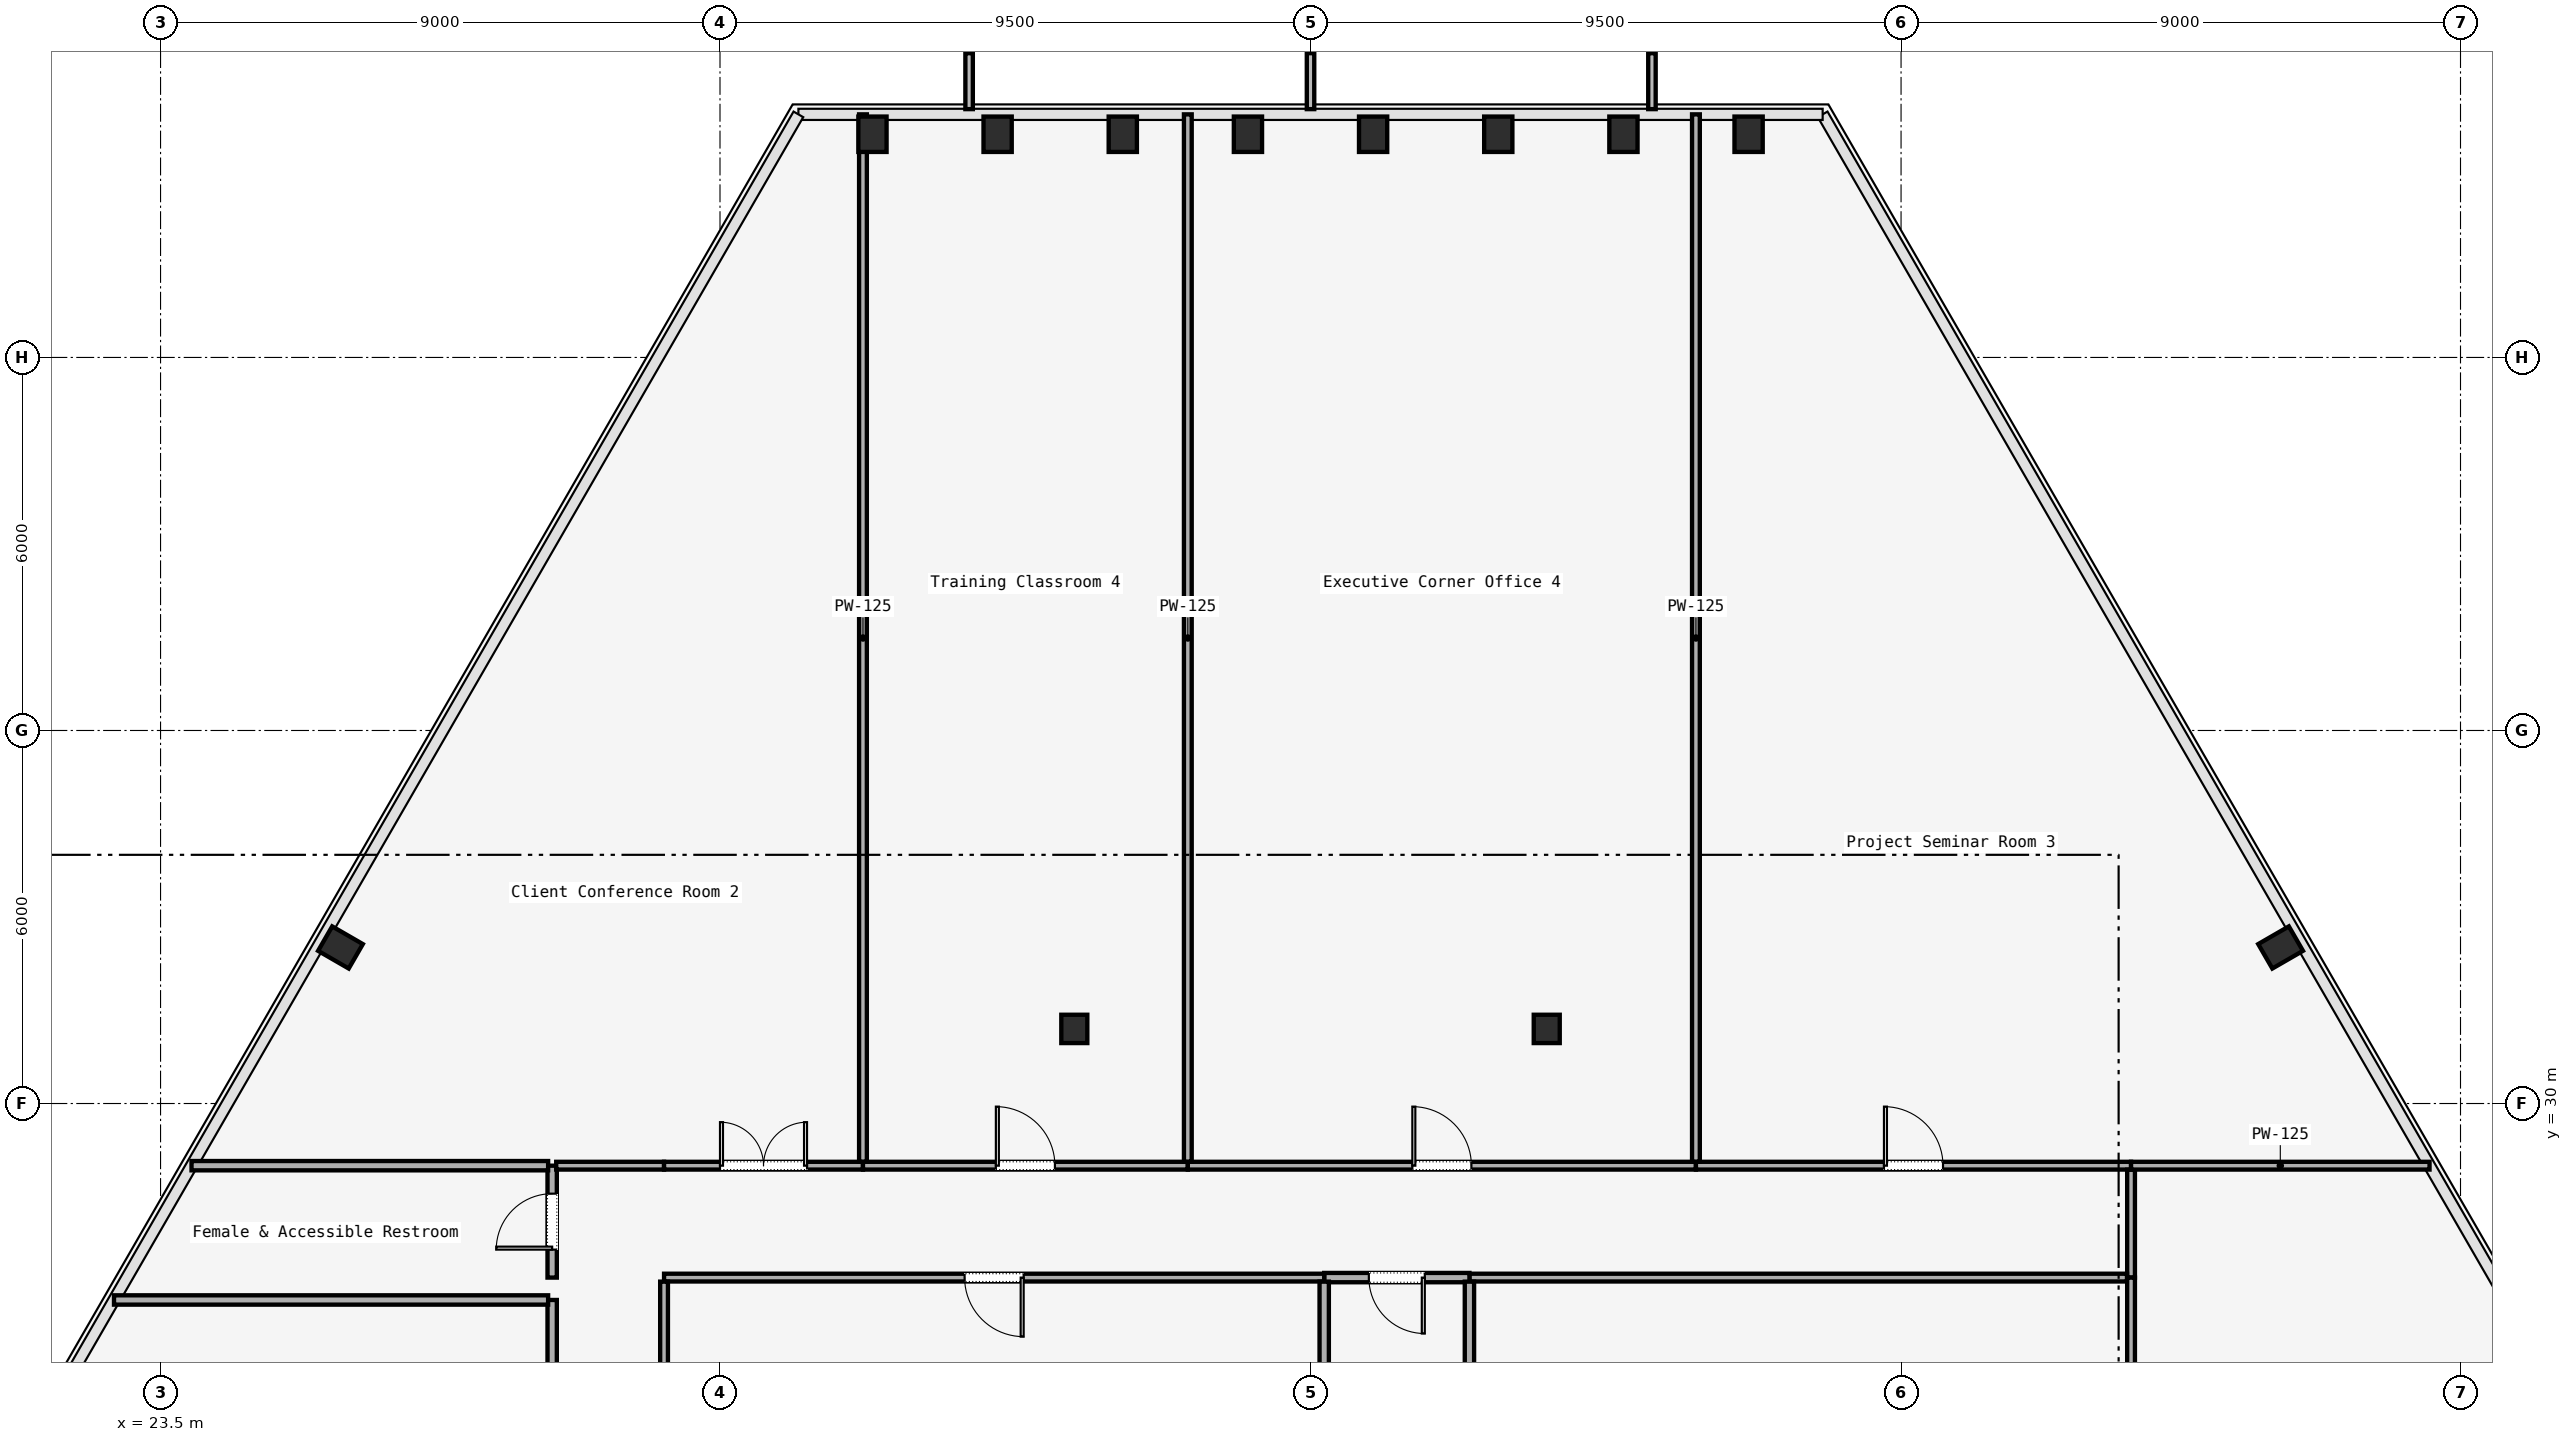
"""IFC4 building model, lengths in metres.
Left out: names, types, materials, properties, quantities, classifications, styles, units other than length and angle.
Written with IfcOpenShell. Run it as: python <this file> out.ifc"""

import sys

from ifc_helpers import new_model, si_unit, direction, frame, frame_2d, origin, origin_2d, place, context, subcontext, project, spatial, rectangle, i_section, extrude, element, fill, save


model = new_model("IFC4")
c1 = context("Model", 3, precision=1e-05, world=origin(), true_north=direction((0.0, 1.0)))
c2 = subcontext(c1, "Body", "Model", "MODEL_VIEW")
j1 = project(units=[si_unit("LENGTHUNIT", "METRE"), si_unit("PLANEANGLEUNIT", "RADIAN")], contexts=[c1])
p1 = place(None, origin())
s1 = spatial("IfcSite", under=j1, at=p1, CompositionType="ELEMENT")
p2 = place(p1, origin())
s2 = spatial("IfcBuilding", under=s1, at=p2, CompositionType="ELEMENT")
p3 = place(p2, frame((0.0, 0.0, 36.0)))
s3 = spatial("IfcBuildingStorey", under=s2, at=p3, CompositionType="ELEMENT", Elevation=36.0)
for number, where, z_axis, x_axis in (
    (1, (38.2, 31.2, 0.0), (0.0, 0.0, 1.0), (1.0, 0.0, 0.0)),
    (2, (45.8, 31.2, 0.0), (0.0, 0.0, 1.0), (1.0, 0.0, 0.0)),
):
    element("IfcColumn", number, at=place(p3, frame(where, z_axis=z_axis, x_axis=x_axis)), inside=s3, PredefinedType="COLUMN", context=c2, shape_type="SweptSolid", body=[
        extrude(i_section(OverallWidth=0.418, OverallDepth=0.456, WebThickness=0.042, FlangeThickness=0.067, FilletRadius=0.015, at=origin_2d()), origin(), (0.0, 0.0, 1.0), 3.58),
    ])
for number, where, z_axis, x_axis in (
    (3, (57.606, 32.51, 0.0), (0.0, 0.0, 1.0), (-0.5, 0.866, 0.0)),
    (4, (49.047, 45.59, 0.0), (0.0, 0.0, 1.0), (1.0, 0.0, 0.0)),
    (5, (47.034, 45.59, 0.0), (0.0, 0.0, 1.0), (1.0, 0.0, 0.0)),
    (6, (45.02, 45.59, 0.0), (0.0, 0.0, 1.0), (1.0, 0.0, 0.0)),
    (7, (43.007, 45.59, 0.0), (0.0, 0.0, 1.0), (1.0, 0.0, 0.0)),
    (8, (40.993, 45.59, 0.0), (0.0, 0.0, 1.0), (1.0, 0.0, 0.0)),
    (9, (38.98, 45.59, 0.0), (0.0, 0.0, 1.0), (1.0, 0.0, 0.0)),
    (10, (36.966, 45.59, 0.0), (0.0, 0.0, 1.0), (1.0, 0.0, 0.0)),
    (11, (34.953, 45.59, 0.0), (0.0, 0.0, 1.0), (1.0, 0.0, 0.0)),
    (12, (26.394, 32.51, 0.0), (0.0, 0.0, 1.0), (0.5, 0.866, 0.0)),
):
    element("IfcColumn", number, at=place(p3, frame(where, z_axis=z_axis, x_axis=x_axis)), inside=s3, PredefinedType="COLUMN", context=c2, shape_type="SweptSolid", body=[
        extrude(i_section(OverallWidth=0.454, OverallDepth=0.569, WebThickness=0.078, FlangeThickness=0.08, FilletRadius=0.015, at=origin_2d()), origin(), (0.0, 0.0, 1.0), 3.58),
    ])
p4 = place(p3, frame((29.8, 17.065, 0.0), z_axis=(0.0, 0.0, 1.0), x_axis=(0.0, 1.0, 0.0)))
e13 = element("IfcWall", 13, at=p4, inside=s3, PredefinedType="PARTITIONING", context=c2, shape_type="SweptSolid", body=[
    extrude(rectangle(XDim=9.775, YDim=0.15, at=frame_2d((4.888, 0.0))), origin(), (0.0, 0.0, 1.0), 2.933),
])
p5 = place(p4, frame((4.413, 0.0, 0.0)))
e14 = element("IfcOpeningElement", 14, at=p5, cuts=e13, PredefinedType="OPENING", context=c2, shape_type="SweptSolid", body=[
    extrude(rectangle(XDim=0.95, YDim=2.2, at=frame_2d((0.475, 1.1))), frame((0.0, 0.075, 0.0), z_axis=(0.0, -1.0, 0.0), x_axis=(1.0, 0.0, 0.0)), (0.0, 0.0, 1.0), 0.15),
])
p6 = place(p3, frame((29.8, 27.2, 0.0), z_axis=(0.0, 0.0, 1.0), x_axis=(0.0, 1.0, 0.0)))
e15 = element("IfcWall", 15, at=p6, inside=s3, PredefinedType="PARTITIONING", context=c2, shape_type="SweptSolid", body=[
    extrude(rectangle(XDim=1.8, YDim=0.15, at=frame_2d((0.9, 0.0))), origin(), (0.0, 0.0, 1.0), 2.933),
])
p7 = place(p6, frame((0.45, 0.0, 0.0)))
e16 = element("IfcOpeningElement", 16, at=p7, cuts=e15, PredefinedType="OPENING", context=c2, shape_type="SweptSolid", body=[
    extrude(rectangle(XDim=0.9, YDim=2.15, at=frame_2d((0.45, 1.075))), frame((0.0, 0.075, 0.0), z_axis=(0.0, -1.0, 0.0), x_axis=(1.0, 0.0, 0.0)), (0.0, 0.0, 1.0), 0.15),
])
p8 = place(p3, frame((29.865, 29.0, 0.0), z_axis=(0.0, 0.0, 1.0), x_axis=(1.0, 0.0, 0.0)))
e17 = element("IfcWall", 17, at=p8, inside=s3, PredefinedType="PARTITIONING", context=c2, shape_type="SweptSolid", body=[
    extrude(rectangle(XDim=1.735, YDim=0.125, at=frame_2d((0.868, 0.0))), origin(), (0.0, 0.0, 1.0), 2.933),
])
p9 = place(p3, frame((31.6, 29.0, 0.0), z_axis=(0.0, 0.0, 1.0), x_axis=(1.0, 0.0, 0.0)))
e18 = element("IfcWall", 18, at=p9, inside=s3, PredefinedType="PARTITIONING", context=c2, shape_type="SweptSolid", body=[
    extrude(rectangle(XDim=3.2, YDim=0.125, at=frame_2d((1.6, 0.0))), origin(), (0.0, 0.0, 1.0), 2.933),
])
p10 = place(p9, frame((0.9, 0.0, 0.0)))
e19 = element("IfcOpeningElement", 19, at=p10, cuts=e18, PredefinedType="OPENING", context=c2, shape_type="SweptSolid", body=[
    extrude(rectangle(XDim=1.4, YDim=2.2, at=frame_2d((0.7, 1.1))), frame((0.0, 0.062, 0.0), z_axis=(0.0, -1.0, 0.0), x_axis=(1.0, 0.0, 0.0)), (0.0, 0.0, 1.0), 0.125),
])
p11 = place(p3, frame((34.8, 29.0, 0.0), z_axis=(0.0, 0.0, 1.0), x_axis=(1.0, 0.0, 0.0)))
e20 = element("IfcWall", 20, at=p11, inside=s3, PredefinedType="PARTITIONING", context=c2, shape_type="SweptSolid", body=[
    extrude(rectangle(XDim=5.226, YDim=0.125, at=frame_2d((2.613, 0.0))), origin(), (0.0, 0.0, 1.0), 2.933),
])
p12 = place(p11, frame((2.138, 0.0, 0.0)))
e21 = element("IfcOpeningElement", 21, at=p12, cuts=e20, PredefinedType="OPENING", context=c2, shape_type="SweptSolid", body=[
    extrude(rectangle(XDim=0.95, YDim=2.2, at=frame_2d((0.475, 1.1))), frame((0.0, 0.062, 0.0), z_axis=(0.0, -1.0, 0.0), x_axis=(1.0, 0.0, 0.0)), (0.0, 0.0, 1.0), 0.125),
])
p13 = place(p3, frame((40.026, 29.0, 0.0), z_axis=(0.0, 0.0, 1.0), x_axis=(1.0, 0.0, 0.0)))
e22 = element("IfcWall", 22, at=p13, inside=s3, PredefinedType="PARTITIONING", context=c2, shape_type="SweptSolid", body=[
    extrude(rectangle(XDim=8.174, YDim=0.125, at=frame_2d((4.087, 0.0))), origin(), (0.0, 0.0, 1.0), 2.933),
])
p14 = place(p13, frame((3.612, 0.0, 0.0)))
e23 = element("IfcOpeningElement", 23, at=p14, cuts=e22, PredefinedType="OPENING", context=c2, shape_type="SweptSolid", body=[
    extrude(rectangle(XDim=0.95, YDim=2.2, at=frame_2d((0.475, 1.1))), frame((0.0, 0.062, 0.0), z_axis=(0.0, -1.0, 0.0), x_axis=(1.0, 0.0, 0.0)), (0.0, 0.0, 1.0), 0.125),
])
p15 = place(p3, frame((48.2, 29.0, 0.0), z_axis=(0.0, 0.0, 1.0), x_axis=(1.0, 0.0, 0.0)))
e24 = element("IfcWall", 24, at=p15, inside=s3, PredefinedType="PARTITIONING", context=c2, shape_type="SweptSolid", body=[
    extrude(rectangle(XDim=7.0, YDim=0.125, at=frame_2d((3.5, 0.0))), origin(), (0.0, 0.0, 1.0), 2.933),
])
p16 = place(p15, frame((3.025, 0.0, 0.0)))
e25 = element("IfcOpeningElement", 25, at=p16, cuts=e24, PredefinedType="OPENING", context=c2, shape_type="SweptSolid", body=[
    extrude(rectangle(XDim=0.95, YDim=2.2, at=frame_2d((0.475, 1.1))), frame((0.0, 0.062, 0.0), z_axis=(0.0, -1.0, 0.0), x_axis=(1.0, 0.0, 0.0)), (0.0, 0.0, 1.0), 0.125),
])
p17 = place(p3, frame((55.2, 28.935, 0.0), z_axis=(0.0, 0.0, 1.0), x_axis=(0.0, -1.0, 0.0)))
e26 = element("IfcWall", 26, at=p17, inside=s3, PredefinedType="PARTITIONING", context=c2, shape_type="SweptSolid", body=[
    extrude(rectangle(XDim=1.735, YDim=0.125, at=frame_2d((0.868, 0.0))), origin(), (0.0, 0.0, 1.0), 2.933),
])
p18 = place(p3, frame((55.135, 27.2, 0.0), z_axis=(0.0, 0.0, 1.0), x_axis=(-1.0, 0.0, 0.0)))
e27 = element("IfcWall", 27, at=p18, inside=s3, PredefinedType="PARTITIONING", context=c2, shape_type="SweptSolid", body=[
    extrude(rectangle(XDim=10.579, YDim=0.125, at=frame_2d((5.289, 0.0))), origin(), (0.0, 0.0, 1.0), 2.933),
])
p19 = place(p3, frame((44.556, 27.2, 0.0), z_axis=(0.0, 0.0, 1.0), x_axis=(-1.0, 0.0, 0.0)))
e28 = element("IfcWall", 28, at=p19, inside=s3, PredefinedType="PARTITIONING", context=c2, shape_type="SweptSolid", body=[
    extrude(rectangle(XDim=2.336, YDim=0.15, at=frame_2d((1.168, 0.0))), origin(), (0.0, 0.0, 1.0), 2.933),
])
p20 = place(p19, frame((0.718, 0.0, 0.0)))
e29 = element("IfcOpeningElement", 29, at=p20, cuts=e28, PredefinedType="OPENING", context=c2, shape_type="SweptSolid", body=[
    extrude(rectangle(XDim=0.9, YDim=2.15, at=frame_2d((0.45, 1.075))), frame((0.0, 0.075, 0.0), z_axis=(0.0, -1.0, 0.0), x_axis=(1.0, 0.0, 0.0)), (0.0, 0.0, 1.0), 0.15),
])
p21 = place(p3, frame((42.22, 27.2, 0.0), z_axis=(0.0, 0.0, 1.0), x_axis=(-1.0, 0.0, 0.0)))
e30 = element("IfcWall", 30, at=p21, inside=s3, PredefinedType="PARTITIONING", context=c2, shape_type="SweptSolid", body=[
    extrude(rectangle(XDim=10.62, YDim=0.125, at=frame_2d((5.31, 0.0))), origin(), (0.0, 0.0, 1.0), 2.933),
])
p22 = place(p21, frame((4.835, 0.0, 0.0)))
e31 = element("IfcOpeningElement", 31, at=p22, cuts=e30, PredefinedType="OPENING", context=c2, shape_type="SweptSolid", body=[
    extrude(rectangle(XDim=0.95, YDim=2.2, at=frame_2d((0.475, 1.1))), frame((0.0, 0.062, 0.0), z_axis=(0.0, -1.0, 0.0), x_axis=(1.0, 0.0, 0.0)), (0.0, 0.0, 1.0), 0.125),
])
p23 = place(p3, frame((31.6, 27.135, 0.0), z_axis=(0.0, 0.0, 1.0), x_axis=(0.0, -1.0, 0.0)))
e32 = element("IfcWall", 32, at=p23, inside=s3, PredefinedType="PARTITIONING", context=c2, shape_type="SweptSolid", body=[
    extrude(rectangle(XDim=10.135, YDim=0.125, at=frame_2d((5.067, 0.0))), origin(), (0.0, 0.0, 1.0), 2.933),
])
p24 = place(p3, frame((22.751, 26.84, 0.0), z_axis=(0.0, 0.0, 1.0), x_axis=(1.0, 0.0, 0.0)))
e33 = element("IfcWall", 33, at=p24, inside=s3, PredefinedType="PARTITIONING", context=c2, shape_type="SweptSolid", body=[
    extrude(rectangle(XDim=6.984, YDim=0.15, at=frame_2d((3.492, 0.0))), origin(), (0.0, 0.0, 1.0), 2.933),
])
for number, where, z_axis, x_axis in (
    (34, (42.22, 27.135, 0.0), (0.0, 0.0, 1.0), (0.0, -1.0, 0.0)),
    (35, (44.556, 27.135, 0.0), (0.0, 0.0, 1.0), (0.0, -1.0, 0.0)),
):
    element("IfcWall", number, at=place(p3, frame(where, z_axis=z_axis, x_axis=x_axis)), inside=s3, PredefinedType="PARTITIONING", context=c2, shape_type="SweptSolid", body=[
        extrude(rectangle(XDim=10.07, YDim=0.15, at=frame_2d((5.035, 0.0))), origin(), (0.0, 0.0, 1.0), 2.933),
    ])
p25 = place(p3, frame((55.2, 27.2, 0.0), z_axis=(0.0, 0.0, 1.0), x_axis=(0.0, -1.0, 0.0)))
e36 = element("IfcWall", 36, at=p25, inside=s3, PredefinedType="PARTITIONING", context=c2, shape_type="SweptSolid", body=[
    extrude(rectangle(XDim=10.135, YDim=0.125, at=frame_2d((5.067, 0.0))), origin(), (0.0, 0.0, 1.0), 2.933),
])
p26 = place(p3, frame((55.2, 29.0, 0.0), z_axis=(0.0, 0.0, 1.0), x_axis=(1.0, 0.0, 0.0)))
e37 = element("IfcWall", 37, at=p26, inside=s3, PredefinedType="PARTITIONING", context=c2, shape_type="SweptSolid", body=[
    extrude(rectangle(XDim=4.802, YDim=0.125, at=frame_2d((2.401, 0.0))), origin(), (0.0, 0.0, 1.0), 2.933),
])
p27 = place(p3, frame((23.998, 29.0, 0.0), z_axis=(0.0, 0.0, 1.0), x_axis=(1.0, 0.0, 0.0)))
e38 = element("IfcWall", 38, at=p27, inside=s3, PredefinedType="PARTITIONING", context=c2, shape_type="SweptSolid", body=[
    extrude(rectangle(XDim=5.737, YDim=0.15, at=frame_2d((2.868, 0.0))), origin(), (0.0, 0.0, 1.0), 2.933),
])
for number, where, z_axis, x_axis in (
    (39, (34.8, 45.91, 0.0), (0.0, 0.0, 1.0), (0.0, -1.0, 0.0)),
    (40, (48.2, 29.065, 0.0), (0.0, 0.0, 1.0), (0.0, 1.0, 0.0)),
    (41, (40.026, 29.065, 0.0), (0.0, 0.0, 1.0), (0.0, 1.0, 0.0)),
):
    element("IfcWall", number, at=place(p3, frame(where, z_axis=z_axis, x_axis=x_axis)), inside=s3, PredefinedType="PARTITIONING", context=c2, shape_type="SweptSolid", body=[
        extrude(rectangle(XDim=16.845, YDim=0.125, at=frame_2d((8.422, 0.0))), origin(), (0.0, 0.0, 1.0), 2.933),
    ])
p28 = place(p22, origin())
e42 = element("IfcDoor", 42, at=p28, inside=s3, OperationType="SINGLE_SWING_RIGHT", PredefinedType="DOOR", context=c2, shape_type="SweptSolid", body=[
    extrude(rectangle(XDim=0.95, YDim=2.2, at=frame_2d((0.475, 1.1))), frame((0.0, 0.025, 0.0), z_axis=(0.0, -1.0, 0.0), x_axis=(1.0, 0.0, 0.0)), (0.0, 0.0, 1.0), 0.05),
])
fill(e31, e42)
p29 = place(p20, origin())
e43 = element("IfcDoor", 43, at=p29, inside=s3, OperationType="SINGLE_SWING_LEFT", PredefinedType="DOOR", context=c2, shape_type="SweptSolid", body=[
    extrude(rectangle(XDim=0.9, YDim=2.15, at=frame_2d((0.45, 1.075))), frame((0.0, 0.025, 0.0), z_axis=(0.0, -1.0, 0.0), x_axis=(1.0, 0.0, 0.0)), (0.0, 0.0, 1.0), 0.05),
])
fill(e29, e43)
p30 = place(p7, origin())
e44 = element("IfcDoor", 44, at=p30, inside=s3, OperationType="SINGLE_SWING_RIGHT", PredefinedType="DOOR", context=c2, shape_type="SweptSolid", body=[
    extrude(rectangle(XDim=0.9, YDim=2.15, at=frame_2d((0.45, 1.075))), frame((0.0, 0.025, 0.0), z_axis=(0.0, -1.0, 0.0), x_axis=(1.0, 0.0, 0.0)), (0.0, 0.0, 1.0), 0.05),
])
fill(e16, e44)
p31 = place(p10, origin())
e45 = element("IfcDoor", 45, at=p31, inside=s3, OperationType="SINGLE_SWING_LEFT", PredefinedType="DOOR", context=c2, shape_type="SweptSolid", body=[
    extrude(rectangle(XDim=1.4, YDim=2.2, at=frame_2d((0.7, 1.1))), frame((0.0, 0.025, 0.0), z_axis=(0.0, -1.0, 0.0), x_axis=(1.0, 0.0, 0.0)), (0.0, 0.0, 1.0), 0.05),
])
fill(e19, e45)
p32 = place(p16, origin())
e46 = element("IfcDoor", 46, at=p32, inside=s3, OperationType="SINGLE_SWING_RIGHT", PredefinedType="DOOR", context=c2, shape_type="SweptSolid", body=[
    extrude(rectangle(XDim=0.95, YDim=2.2, at=frame_2d((0.475, 1.1))), frame((0.0, 0.025, 0.0), z_axis=(0.0, -1.0, 0.0), x_axis=(1.0, 0.0, 0.0)), (0.0, 0.0, 1.0), 0.05),
])
fill(e25, e46)
p33 = place(p14, origin())
e47 = element("IfcDoor", 47, at=p33, inside=s3, OperationType="SINGLE_SWING_LEFT", PredefinedType="DOOR", context=c2, shape_type="SweptSolid", body=[
    extrude(rectangle(XDim=0.95, YDim=2.2, at=frame_2d((0.475, 1.1))), frame((0.0, 0.025, 0.0), z_axis=(0.0, -1.0, 0.0), x_axis=(1.0, 0.0, 0.0)), (0.0, 0.0, 1.0), 0.05),
])
fill(e23, e47)
p34 = place(p12, origin())
e48 = element("IfcDoor", 48, at=p34, inside=s3, OperationType="SINGLE_SWING_RIGHT", PredefinedType="DOOR", context=c2, shape_type="SweptSolid", body=[
    extrude(rectangle(XDim=0.95, YDim=2.2, at=frame_2d((0.475, 1.1))), frame((0.0, 0.025, 0.0), z_axis=(0.0, -1.0, 0.0), x_axis=(1.0, 0.0, 0.0)), (0.0, 0.0, 1.0), 0.05),
])
fill(e21, e48)
save(model, sys.argv[1])
